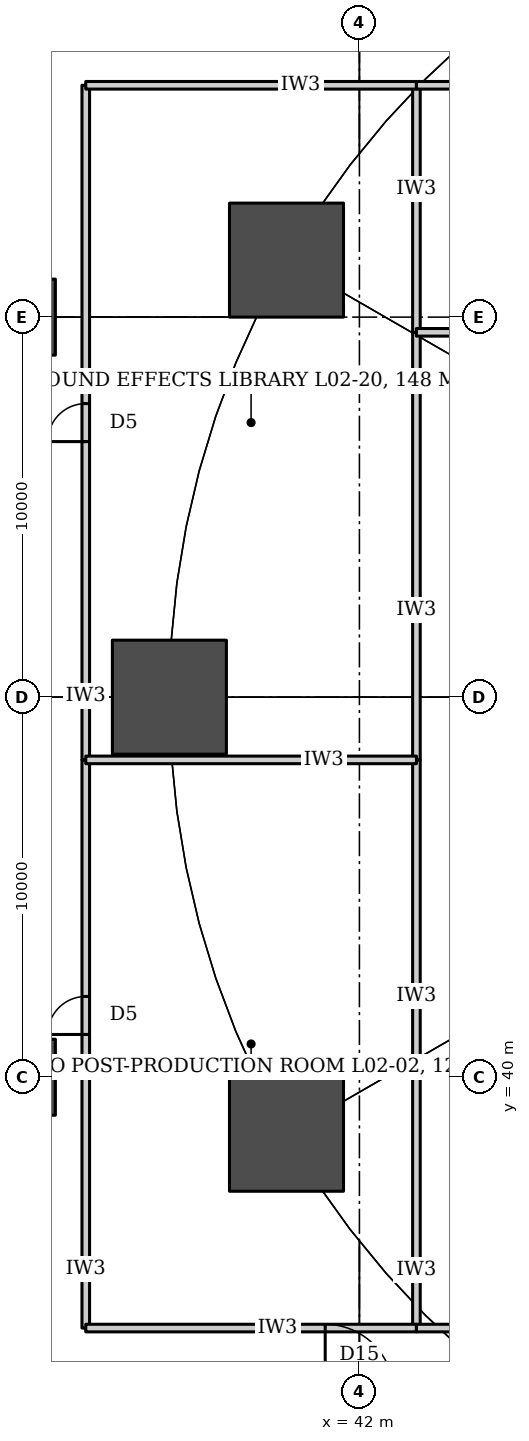
"""IFC4 building model, lengths in metres.
Left out: names, types, materials, properties, quantities, classifications, styles, units other than length and angle.
Written with IfcOpenShell. Run it as: python <this file> out.ifc"""

import sys

from ifc_helpers import new_model, si_unit, direction, frame, frame_2d, origin, origin_2d, place, context, subcontext, project, spatial, rectangle, circle, extrude, element, fill, save


model = new_model("IFC4")
c1 = context("Model", 3, precision=1e-05, world=origin(), true_north=direction((0.0, 1.0)))
c2 = subcontext(c1, "Body", "Model", "MODEL_VIEW")
j1 = project(units=[si_unit("LENGTHUNIT", "METRE"), si_unit("PLANEANGLEUNIT", "RADIAN")], contexts=[c1])
p1 = place(None, origin())
s1 = spatial("IfcSite", under=j1, at=p1, CompositionType="ELEMENT")
p2 = place(p1, origin())
s2 = spatial("IfcBuilding", under=s1, at=p2, CompositionType="ELEMENT")
p3 = place(p2, frame((0.0, 0.0, 15.0)))
s3 = spatial("IfcBuildingStorey", under=s2, at=p3, CompositionType="ELEMENT", Elevation=15.0)
for number, where, z_axis, x_axis in (
    (1, (33.0, 40.0, 0.0), (0.0, 0.0, 1.0), (1.0, 0.0, 0.0)),
    (2, (33.0, 60.0, 0.0), (0.0, 0.0, 1.0), (1.0, 0.0, 0.0)),
):
    element("IfcColumn", number, at=place(p3, frame(where, z_axis=z_axis, x_axis=x_axis)), inside=s3, PredefinedType="COLUMN", context=c2, shape_type="SweptSolid", body=[
        extrude(rectangle(XDim=2.0, YDim=2.0, at=origin_2d()), origin(), (0.0, 0.0, 1.0), 5.0),
    ])
for number, where, z_axis, x_axis in (
    (3, (40.081, 61.5, 0.0), (0.0, 0.0, 1.0), (1.0, 0.0, 0.0)),
    (4, (37.0, 50.0, 0.0), (0.0, 0.0, 1.0), (1.0, 0.0, 0.0)),
    (5, (40.081, 38.5, 0.0), (0.0, 0.0, 1.0), (1.0, 0.0, 0.0)),
):
    element("IfcColumn", number, at=place(p3, frame(where, z_axis=z_axis, x_axis=x_axis)), inside=s3, PredefinedType="COLUMN", context=c2, shape_type="SweptSolid", body=[
        extrude(circle(Radius=1.5, at=origin_2d()), origin(), (0.0, 0.0, 1.0), 5.0),
    ])
p4 = place(p3, frame((34.8, 33.4, 0.0), z_axis=(0.0, 0.0, 1.0), x_axis=(0.0, 1.0, 0.0)))
e6 = element("IfcWall", 6, at=p4, inside=s3, PredefinedType="PARTITIONING", context=c2, shape_type="SweptSolid", body=[
    extrude(rectangle(XDim=14.95, YDim=0.2, at=frame_2d((7.475, 0.0))), origin(), (0.0, 0.0, 1.0), 2.68),
])
p5 = place(p4, frame((7.725, 0.0, 0.0)))
e7 = element("IfcOpeningElement", 7, at=p5, cuts=e6, PredefinedType="OPENING", context=c2, shape_type="SweptSolid", body=[
    extrude(rectangle(XDim=1.0, YDim=2.1, at=frame_2d((0.5, 1.05))), frame((0.0, 0.11, 0.0), z_axis=(0.0, -1.0, 0.0), x_axis=(1.0, 0.0, 0.0)), (0.0, 0.0, 1.0), 0.22),
])
p6 = place(p3, frame((34.8, 48.35, 0.0), z_axis=(0.0, 0.0, 1.0), x_axis=(0.0, 1.0, 0.0)))
e8 = element("IfcWall", 8, at=p6, inside=s3, PredefinedType="PARTITIONING", context=c2, shape_type="SweptSolid", body=[
    extrude(rectangle(XDim=17.75, YDim=0.2, at=frame_2d((8.875, 0.0))), origin(), (0.0, 0.0, 1.0), 2.18),
])
p7 = place(p6, frame((8.375, 0.0, 0.0)))
e9 = element("IfcOpeningElement", 9, at=p7, cuts=e8, PredefinedType="OPENING", context=c2, shape_type="SweptSolid", body=[
    extrude(rectangle(XDim=1.0, YDim=2.1, at=frame_2d((0.5, 1.05))), frame((0.0, 0.11, 0.0), z_axis=(0.0, -1.0, 0.0), x_axis=(1.0, 0.0, 0.0)), (0.0, 0.0, 1.0), 0.22),
])
p8 = place(p3, frame((43.5, 33.4, 0.0), z_axis=(0.0, 0.0, 1.0), x_axis=(0.0, 1.0, 0.0)))
e10 = element("IfcWall", 10, at=p8, inside=s3, PredefinedType="PARTITIONING", context=c2, shape_type="SweptSolid", body=[
    extrude(rectangle(XDim=7.0, YDim=0.2, at=frame_2d((3.5, 0.0))), origin(), (0.0, 0.0, 1.0), 2.08),
])
p9 = place(p3, frame((43.5, 40.4, 0.0), z_axis=(0.0, 0.0, 1.0), x_axis=(0.0, 1.0, 0.0)))
e11 = element("IfcWall", 11, at=p9, inside=s3, PredefinedType="PARTITIONING", context=c2, shape_type="SweptSolid", body=[
    extrude(rectangle(XDim=7.95, YDim=0.2, at=frame_2d((3.975, 0.0))), origin(), (0.0, 0.0, 1.0), 2.08),
])
p10 = place(p3, frame((43.5, 48.35, 0.0), z_axis=(0.0, 0.0, 1.0), x_axis=(0.0, 1.0, 0.0)))
e12 = element("IfcWall", 12, at=p10, inside=s3, PredefinedType="PARTITIONING", context=c2, shape_type="SweptSolid", body=[
    extrude(rectangle(XDim=11.25, YDim=0.2, at=frame_2d((5.625, 0.0))), origin(), (0.0, 0.0, 1.0), 2.08),
])
p11 = place(p3, frame((43.5, 59.6, 0.0), z_axis=(0.0, 0.0, 1.0), x_axis=(0.0, 1.0, 0.0)))
e13 = element("IfcWall", 13, at=p11, inside=s3, PredefinedType="PARTITIONING", context=c2, shape_type="SweptSolid", body=[
    extrude(rectangle(XDim=6.5, YDim=0.2, at=frame_2d((3.25, 0.0))), origin(), (0.0, 0.0, 1.0), 2.08),
])
p12 = place(p3, frame((34.8, 33.4, 0.0), z_axis=(0.0, 0.0, 1.0), x_axis=(1.0, 0.0, 0.0)))
e14 = element("IfcWall", 14, at=p12, inside=s3, PredefinedType="PARTITIONING", context=c2, shape_type="SweptSolid", body=[
    extrude(rectangle(XDim=8.7, YDim=0.2, at=frame_2d((4.35, 0.0))), origin(), (0.0, 0.0, 1.0), 2.68),
])
p13 = place(p3, frame((43.5, 33.4, 0.0), z_axis=(0.0, 0.0, 1.0), x_axis=(1.0, 0.0, 0.0)))
e15 = element("IfcWall", 15, at=p13, inside=s3, PredefinedType="PARTITIONING", context=c2, shape_type="SweptSolid", body=[
    extrude(rectangle(XDim=18.55, YDim=0.2, at=frame_2d((9.275, 0.0))), origin(), (0.0, 0.0, 1.0), 2.08),
])
p14 = place(p13, frame((8.775, 0.0, 0.0)))
e16 = element("IfcOpeningElement", 16, at=p14, cuts=e15, PredefinedType="OPENING", context=c2, shape_type="SweptSolid", body=[
    extrude(rectangle(XDim=1.0, YDim=2.1, at=frame_2d((0.5, 1.05))), frame((0.0, 0.11, 0.0), z_axis=(0.0, -1.0, 0.0), x_axis=(1.0, 0.0, 0.0)), (0.0, 0.0, 1.0), 0.22),
])
p15 = place(p3, frame((43.5, 40.4, 0.0), z_axis=(0.0, 0.0, 1.0), x_axis=(1.0, 0.0, 0.0)))
e17 = element("IfcWall", 17, at=p15, inside=s3, PredefinedType="PARTITIONING", context=c2, shape_type="SweptSolid", body=[
    extrude(rectangle(XDim=18.55, YDim=0.2, at=frame_2d((9.275, 0.0))), origin(), (0.0, 0.0, 1.0), 1.48),
])
p16 = place(p3, frame((34.8, 48.35, 0.0), z_axis=(0.0, 0.0, 1.0), x_axis=(1.0, 0.0, 0.0)))
e18 = element("IfcWall", 18, at=p16, inside=s3, PredefinedType="PARTITIONING", context=c2, shape_type="SweptSolid", body=[
    extrude(rectangle(XDim=8.7, YDim=0.2, at=frame_2d((4.35, 0.0))), origin(), (0.0, 0.0, 1.0), 2.68),
])
p17 = place(p3, frame((43.5, 59.6, 0.0), z_axis=(0.0, 0.0, 1.0), x_axis=(1.0, 0.0, 0.0)))
e19 = element("IfcWall", 19, at=p17, inside=s3, PredefinedType="PARTITIONING", context=c2, shape_type="SweptSolid", body=[
    extrude(rectangle(XDim=18.55, YDim=0.2, at=frame_2d((9.275, 0.0))), origin(), (0.0, 0.0, 1.0), 1.48),
])
p18 = place(p3, frame((34.8, 66.1, 0.0), z_axis=(0.0, 0.0, 1.0), x_axis=(1.0, 0.0, 0.0)))
e20 = element("IfcWall", 20, at=p18, inside=s3, PredefinedType="PARTITIONING", context=c2, shape_type="SweptSolid", body=[
    extrude(rectangle(XDim=8.7, YDim=0.2, at=frame_2d((4.35, 0.0))), origin(), (0.0, 0.0, 1.0), 2.68),
])
p19 = place(p3, frame((43.5, 66.1, 0.0), z_axis=(0.0, 0.0, 1.0), x_axis=(1.0, 0.0, 0.0)))
e21 = element("IfcWall", 21, at=p19, inside=s3, PredefinedType="PARTITIONING", context=c2, shape_type="SweptSolid", body=[
    extrude(rectangle(XDim=18.55, YDim=0.2, at=frame_2d((9.275, 0.0))), origin(), (0.0, 0.0, 1.0), 2.08),
])
p20 = place(p19, frame((8.775, 0.0, 0.0)))
e22 = element("IfcOpeningElement", 22, at=p20, cuts=e21, PredefinedType="OPENING", context=c2, shape_type="SweptSolid", body=[
    extrude(rectangle(XDim=1.0, YDim=2.1, at=frame_2d((0.5, 1.05))), frame((0.0, 0.11, 0.0), z_axis=(0.0, -1.0, 0.0), x_axis=(1.0, 0.0, 0.0)), (0.0, 0.0, 1.0), 0.22),
])
p21 = place(p5, origin())
e23 = element("IfcDoor", 23, at=p21, inside=s3, OperationType="SINGLE_SWING_LEFT", PredefinedType="DOOR", context=c2, shape_type="SweptSolid", body=[
    extrude(rectangle(XDim=1.0, YDim=2.1, at=frame_2d((0.5, 1.05))), frame((0.0, 0.025, 0.0), z_axis=(0.0, -1.0, 0.0), x_axis=(1.0, 0.0, 0.0)), (0.0, 0.0, 1.0), 0.05),
])
fill(e7, e23)
p22 = place(p7, origin())
e24 = element("IfcDoor", 24, at=p22, inside=s3, OperationType="SINGLE_SWING_LEFT", PredefinedType="DOOR", context=c2, shape_type="SweptSolid", body=[
    extrude(rectangle(XDim=1.0, YDim=2.1, at=frame_2d((0.5, 1.05))), frame((0.0, 0.025, 0.0), z_axis=(0.0, -1.0, 0.0), x_axis=(1.0, 0.0, 0.0)), (0.0, 0.0, 1.0), 0.05),
])
fill(e9, e24)
save(model, sys.argv[1])
